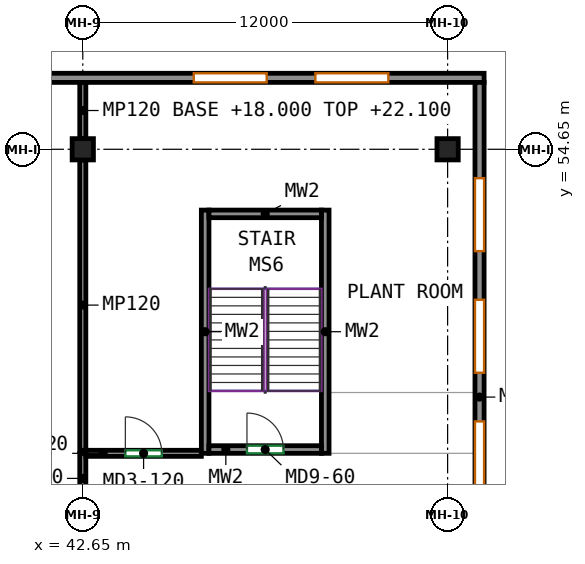
"""IFC4 building model, lengths in metres.
Left out: names, types, materials, properties, quantities, classifications, styles, units other than length and angle.
Written with IfcOpenShell. Run it as: python <this file> out.ifc"""

import sys

from ifc_helpers import new_model, si_unit, direction, frame, frame_2d, origin, origin_2d, place, context, subcontext, project, spatial, rectangle, extrude, source, transform, mapped, element, fill, save


model = new_model("IFC4")
c1 = context("Model", 3, precision=1e-05, world=origin(), true_north=direction((0.0, 1.0)))
c2 = subcontext(c1, "Body", "Model", "MODEL_VIEW")
j1 = project(units=[si_unit("LENGTHUNIT", "METRE"), si_unit("PLANEANGLEUNIT", "RADIAN")], contexts=[c1])
p1 = place(None, origin())
s1 = spatial("IfcSite", under=j1, at=p1, CompositionType="ELEMENT")
p2 = place(p1, origin())
s2 = spatial("IfcBuilding", under=s1, at=p2, CompositionType="ELEMENT")
p3 = place(p2, frame((0.0, 0.0, 18.0)))
s3 = spatial("IfcBuildingStorey", under=s2, at=p3, CompositionType="ELEMENT", Elevation=18.0)
m1 = source(origin(), c2, "Body", "SweptSolid", [
    extrude(rectangle(XDim=0.7, YDim=0.7, at=origin_2d()), origin(), (0.0, 0.0, 1.0), 4.1),
])
for number, where, z_axis, x_axis in (
    (1, (42.65, 54.65, 0.0), (0.0, 0.0, 1.0), (1.0, 0.0, 0.0)),
    (2, (54.65, 54.65, 0.0), (0.0, 0.0, 1.0), (1.0, 0.0, 0.0)),
):
    element("IfcColumn", number, at=place(p3, frame(where, z_axis=z_axis, x_axis=x_axis)), inside=s3, PredefinedType="COLUMN", context=c2, shape_type="MappedRepresentation", body=[
        mapped(m1, transform((0.0, 0.0, 0.0))),
    ])
m2 = source(origin(), c2, "Body", "SweptSolid", [
    extrude(rectangle(XDim=8.0, YDim=0.25, at=frame_2d((4.0, 0.0))), origin(), (0.0, 0.0, 1.0), 4.1),
])
for number, where, z_axis, x_axis in (
    (3, (46.675, 44.65, 0.0), (0.0, 0.0, 1.0), (0.0, 1.0, 0.0)),
    (4, (50.625, 44.65, 0.0), (0.0, 0.0, 1.0), (0.0, 1.0, 0.0)),
):
    element("IfcWall", number, at=place(p3, frame(where, z_axis=z_axis, x_axis=x_axis)), inside=s3, PredefinedType="SHEAR", context=c2, shape_type="MappedRepresentation", body=[
        mapped(m2, transform((0.0, 0.0, 0.0))),
    ])
m3 = source(origin(), c2, "Body", "SweptSolid", [
    extrude(rectangle(XDim=3.7, YDim=0.25, at=frame_2d((1.85, 0.0))), origin(), (0.0, 0.0, 1.0), 4.1),
])
p4 = place(p3, frame((46.8, 44.775, 0.0), z_axis=(0.0, 0.0, 1.0), x_axis=(1.0, 0.0, 0.0)))
e5 = element("IfcWall", 5, at=p4, inside=s3, PredefinedType="SHEAR", context=c2, shape_type="MappedRepresentation", body=[
    mapped(m3, transform((0.0, 0.0, 0.0))),
])
p5 = place(p4, frame((1.25, 0.0, 0.0)))
e6 = element("IfcOpeningElement", 6, at=p5, cuts=e5, PredefinedType="OPENING", context=c2, shape_type="SweptSolid", body=[
    extrude(rectangle(XDim=1.2, YDim=2.1, at=frame_2d((0.6, 1.05))), frame((0.0, 0.135, 0.0), z_axis=(0.0, -1.0, 0.0), x_axis=(1.0, 0.0, 0.0)), (0.0, 0.0, 1.0), 0.27),
])
p6 = place(p3, frame((46.8, 52.525, 0.0), z_axis=(0.0, 0.0, 1.0), x_axis=(1.0, 0.0, 0.0)))
e7 = element("IfcWall", 7, at=p6, inside=s3, PredefinedType="SHEAR", context=c2, shape_type="MappedRepresentation", body=[
    mapped(m3, transform((0.0, 0.0, 0.0))),
])
m4 = source(origin(), c2, "Body", "SweptSolid", [
    extrude(rectangle(XDim=112.7, YDim=0.3, at=frame_2d((56.35, 0.0))), origin(), (0.0, 0.0, 1.0), 4.1),
])
p7 = place(p3, frame((-56.85, 57.0, 0.0), z_axis=(0.0, 0.0, 1.0), x_axis=(1.0, 0.0, 0.0)))
e8 = element("IfcWall", 8, at=p7, inside=s3, PredefinedType="SOLIDWALL", context=c2, shape_type="MappedRepresentation", body=[
    mapped(m4, transform((0.0, 0.0, 0.0))),
])
p8 = place(p7, frame((3.15, 0.0, 0.9)))
e9 = element("IfcOpeningElement", 9, at=p8, cuts=e8, PredefinedType="OPENING", context=c2, shape_type="SweptSolid", body=[
    extrude(rectangle(XDim=2.4, YDim=1.8, at=frame_2d((1.2, 0.9))), frame((0.0, 0.16, 0.0), z_axis=(0.0, -1.0, 0.0), x_axis=(1.0, 0.0, 0.0)), (0.0, 0.0, 1.0), 0.32),
])
p9 = place(p7, frame((7.15, 0.0, 0.9)))
e10 = element("IfcOpeningElement", 10, at=p9, cuts=e8, PredefinedType="OPENING", context=c2, shape_type="SweptSolid", body=[
    extrude(rectangle(XDim=2.4, YDim=1.8, at=frame_2d((1.2, 0.9))), frame((0.0, 0.16, 0.0), z_axis=(0.0, -1.0, 0.0), x_axis=(1.0, 0.0, 0.0)), (0.0, 0.0, 1.0), 0.32),
])
p10 = place(p7, frame((11.15, 0.0, 0.9)))
e11 = element("IfcOpeningElement", 11, at=p10, cuts=e8, PredefinedType="OPENING", context=c2, shape_type="SweptSolid", body=[
    extrude(rectangle(XDim=2.4, YDim=1.8, at=frame_2d((1.2, 0.9))), frame((0.0, 0.16, 0.0), z_axis=(0.0, -1.0, 0.0), x_axis=(1.0, 0.0, 0.0)), (0.0, 0.0, 1.0), 0.32),
])
p11 = place(p7, frame((15.15, 0.0, 0.9)))
e12 = element("IfcOpeningElement", 12, at=p11, cuts=e8, PredefinedType="OPENING", context=c2, shape_type="SweptSolid", body=[
    extrude(rectangle(XDim=2.4, YDim=1.8, at=frame_2d((1.2, 0.9))), frame((0.0, 0.16, 0.0), z_axis=(0.0, -1.0, 0.0), x_axis=(1.0, 0.0, 0.0)), (0.0, 0.0, 1.0), 0.32),
])
p12 = place(p7, frame((19.15, 0.0, 0.9)))
e13 = element("IfcOpeningElement", 13, at=p12, cuts=e8, PredefinedType="OPENING", context=c2, shape_type="SweptSolid", body=[
    extrude(rectangle(XDim=2.4, YDim=1.8, at=frame_2d((1.2, 0.9))), frame((0.0, 0.16, 0.0), z_axis=(0.0, -1.0, 0.0), x_axis=(1.0, 0.0, 0.0)), (0.0, 0.0, 1.0), 0.32),
])
p13 = place(p7, frame((23.15, 0.0, 0.9)))
e14 = element("IfcOpeningElement", 14, at=p13, cuts=e8, PredefinedType="OPENING", context=c2, shape_type="SweptSolid", body=[
    extrude(rectangle(XDim=2.4, YDim=1.8, at=frame_2d((1.2, 0.9))), frame((0.0, 0.16, 0.0), z_axis=(0.0, -1.0, 0.0), x_axis=(1.0, 0.0, 0.0)), (0.0, 0.0, 1.0), 0.32),
])
p14 = place(p7, frame((27.15, 0.0, 0.9)))
e15 = element("IfcOpeningElement", 15, at=p14, cuts=e8, PredefinedType="OPENING", context=c2, shape_type="SweptSolid", body=[
    extrude(rectangle(XDim=2.4, YDim=1.8, at=frame_2d((1.2, 0.9))), frame((0.0, 0.16, 0.0), z_axis=(0.0, -1.0, 0.0), x_axis=(1.0, 0.0, 0.0)), (0.0, 0.0, 1.0), 0.32),
])
p15 = place(p7, frame((31.15, 0.0, 0.9)))
e16 = element("IfcOpeningElement", 16, at=p15, cuts=e8, PredefinedType="OPENING", context=c2, shape_type="SweptSolid", body=[
    extrude(rectangle(XDim=2.4, YDim=1.8, at=frame_2d((1.2, 0.9))), frame((0.0, 0.16, 0.0), z_axis=(0.0, -1.0, 0.0), x_axis=(1.0, 0.0, 0.0)), (0.0, 0.0, 1.0), 0.32),
])
p16 = place(p7, frame((35.15, 0.0, 0.9)))
e17 = element("IfcOpeningElement", 17, at=p16, cuts=e8, PredefinedType="OPENING", context=c2, shape_type="SweptSolid", body=[
    extrude(rectangle(XDim=2.4, YDim=1.8, at=frame_2d((1.2, 0.9))), frame((0.0, 0.16, 0.0), z_axis=(0.0, -1.0, 0.0), x_axis=(1.0, 0.0, 0.0)), (0.0, 0.0, 1.0), 0.32),
])
p17 = place(p7, frame((43.15, 0.0, 0.9)))
e18 = element("IfcOpeningElement", 18, at=p17, cuts=e8, PredefinedType="OPENING", context=c2, shape_type="SweptSolid", body=[
    extrude(rectangle(XDim=2.4, YDim=1.8, at=frame_2d((1.2, 0.9))), frame((0.0, 0.16, 0.0), z_axis=(0.0, -1.0, 0.0), x_axis=(1.0, 0.0, 0.0)), (0.0, 0.0, 1.0), 0.32),
])
p18 = place(p7, frame((47.15, 0.0, 0.9)))
e19 = element("IfcOpeningElement", 19, at=p18, cuts=e8, PredefinedType="OPENING", context=c2, shape_type="SweptSolid", body=[
    extrude(rectangle(XDim=2.4, YDim=1.8, at=frame_2d((1.2, 0.9))), frame((0.0, 0.16, 0.0), z_axis=(0.0, -1.0, 0.0), x_axis=(1.0, 0.0, 0.0)), (0.0, 0.0, 1.0), 0.32),
])
p19 = place(p7, frame((51.15, 0.0, 0.9)))
e20 = element("IfcOpeningElement", 20, at=p19, cuts=e8, PredefinedType="OPENING", context=c2, shape_type="SweptSolid", body=[
    extrude(rectangle(XDim=2.4, YDim=1.8, at=frame_2d((1.2, 0.9))), frame((0.0, 0.16, 0.0), z_axis=(0.0, -1.0, 0.0), x_axis=(1.0, 0.0, 0.0)), (0.0, 0.0, 1.0), 0.32),
])
p20 = place(p7, frame((55.15, 0.0, 0.9)))
e21 = element("IfcOpeningElement", 21, at=p20, cuts=e8, PredefinedType="OPENING", context=c2, shape_type="SweptSolid", body=[
    extrude(rectangle(XDim=2.4, YDim=1.8, at=frame_2d((1.2, 0.9))), frame((0.0, 0.16, 0.0), z_axis=(0.0, -1.0, 0.0), x_axis=(1.0, 0.0, 0.0)), (0.0, 0.0, 1.0), 0.32),
])
p21 = place(p7, frame((59.15, 0.0, 0.9)))
e22 = element("IfcOpeningElement", 22, at=p21, cuts=e8, PredefinedType="OPENING", context=c2, shape_type="SweptSolid", body=[
    extrude(rectangle(XDim=2.4, YDim=1.8, at=frame_2d((1.2, 0.9))), frame((0.0, 0.16, 0.0), z_axis=(0.0, -1.0, 0.0), x_axis=(1.0, 0.0, 0.0)), (0.0, 0.0, 1.0), 0.32),
])
p22 = place(p7, frame((63.15, 0.0, 0.9)))
e23 = element("IfcOpeningElement", 23, at=p22, cuts=e8, PredefinedType="OPENING", context=c2, shape_type="SweptSolid", body=[
    extrude(rectangle(XDim=2.4, YDim=1.8, at=frame_2d((1.2, 0.9))), frame((0.0, 0.16, 0.0), z_axis=(0.0, -1.0, 0.0), x_axis=(1.0, 0.0, 0.0)), (0.0, 0.0, 1.0), 0.32),
])
p23 = place(p7, frame((67.15, 0.0, 0.9)))
e24 = element("IfcOpeningElement", 24, at=p23, cuts=e8, PredefinedType="OPENING", context=c2, shape_type="SweptSolid", body=[
    extrude(rectangle(XDim=2.4, YDim=1.8, at=frame_2d((1.2, 0.9))), frame((0.0, 0.16, 0.0), z_axis=(0.0, -1.0, 0.0), x_axis=(1.0, 0.0, 0.0)), (0.0, 0.0, 1.0), 0.32),
])
p24 = place(p7, frame((71.15, 0.0, 0.9)))
e25 = element("IfcOpeningElement", 25, at=p24, cuts=e8, PredefinedType="OPENING", context=c2, shape_type="SweptSolid", body=[
    extrude(rectangle(XDim=2.4, YDim=1.8, at=frame_2d((1.2, 0.9))), frame((0.0, 0.16, 0.0), z_axis=(0.0, -1.0, 0.0), x_axis=(1.0, 0.0, 0.0)), (0.0, 0.0, 1.0), 0.32),
])
p25 = place(p7, frame((75.15, 0.0, 0.9)))
e26 = element("IfcOpeningElement", 26, at=p25, cuts=e8, PredefinedType="OPENING", context=c2, shape_type="SweptSolid", body=[
    extrude(rectangle(XDim=2.4, YDim=1.8, at=frame_2d((1.2, 0.9))), frame((0.0, 0.16, 0.0), z_axis=(0.0, -1.0, 0.0), x_axis=(1.0, 0.0, 0.0)), (0.0, 0.0, 1.0), 0.32),
])
p26 = place(p7, frame((79.15, 0.0, 0.9)))
e27 = element("IfcOpeningElement", 27, at=p26, cuts=e8, PredefinedType="OPENING", context=c2, shape_type="SweptSolid", body=[
    extrude(rectangle(XDim=2.4, YDim=1.8, at=frame_2d((1.2, 0.9))), frame((0.0, 0.16, 0.0), z_axis=(0.0, -1.0, 0.0), x_axis=(1.0, 0.0, 0.0)), (0.0, 0.0, 1.0), 0.32),
])
p27 = place(p7, frame((83.15, 0.0, 0.9)))
e28 = element("IfcOpeningElement", 28, at=p27, cuts=e8, PredefinedType="OPENING", context=c2, shape_type="SweptSolid", body=[
    extrude(rectangle(XDim=2.4, YDim=1.8, at=frame_2d((1.2, 0.9))), frame((0.0, 0.16, 0.0), z_axis=(0.0, -1.0, 0.0), x_axis=(1.0, 0.0, 0.0)), (0.0, 0.0, 1.0), 0.32),
])
p28 = place(p7, frame((87.15, 0.0, 0.9)))
e29 = element("IfcOpeningElement", 29, at=p28, cuts=e8, PredefinedType="OPENING", context=c2, shape_type="SweptSolid", body=[
    extrude(rectangle(XDim=2.4, YDim=1.8, at=frame_2d((1.2, 0.9))), frame((0.0, 0.16, 0.0), z_axis=(0.0, -1.0, 0.0), x_axis=(1.0, 0.0, 0.0)), (0.0, 0.0, 1.0), 0.32),
])
p29 = place(p7, frame((91.15, 0.0, 0.9)))
e30 = element("IfcOpeningElement", 30, at=p29, cuts=e8, PredefinedType="OPENING", context=c2, shape_type="SweptSolid", body=[
    extrude(rectangle(XDim=2.4, YDim=1.8, at=frame_2d((1.2, 0.9))), frame((0.0, 0.16, 0.0), z_axis=(0.0, -1.0, 0.0), x_axis=(1.0, 0.0, 0.0)), (0.0, 0.0, 1.0), 0.32),
])
p30 = place(p7, frame((95.15, 0.0, 0.9)))
e31 = element("IfcOpeningElement", 31, at=p30, cuts=e8, PredefinedType="OPENING", context=c2, shape_type="SweptSolid", body=[
    extrude(rectangle(XDim=2.4, YDim=1.8, at=frame_2d((1.2, 0.9))), frame((0.0, 0.16, 0.0), z_axis=(0.0, -1.0, 0.0), x_axis=(1.0, 0.0, 0.0)), (0.0, 0.0, 1.0), 0.32),
])
p31 = place(p7, frame((103.15, 0.0, 0.9)))
e32 = element("IfcOpeningElement", 32, at=p31, cuts=e8, PredefinedType="OPENING", context=c2, shape_type="SweptSolid", body=[
    extrude(rectangle(XDim=2.4, YDim=1.8, at=frame_2d((1.2, 0.9))), frame((0.0, 0.16, 0.0), z_axis=(0.0, -1.0, 0.0), x_axis=(1.0, 0.0, 0.0)), (0.0, 0.0, 1.0), 0.32),
])
p32 = place(p7, frame((107.15, 0.0, 0.9)))
e33 = element("IfcOpeningElement", 33, at=p32, cuts=e8, PredefinedType="OPENING", context=c2, shape_type="SweptSolid", body=[
    extrude(rectangle(XDim=2.4, YDim=1.8, at=frame_2d((1.2, 0.9))), frame((0.0, 0.16, 0.0), z_axis=(0.0, -1.0, 0.0), x_axis=(1.0, 0.0, 0.0)), (0.0, 0.0, 1.0), 0.32),
])
m5 = source(origin(), c2, "Body", "SweptSolid", [
    extrude(rectangle(XDim=20.7, YDim=0.3, at=frame_2d((10.35, 0.0))), origin(), (0.0, 0.0, 1.0), 4.1),
])
p33 = place(p3, frame((55.7, 56.85, 0.0), z_axis=(0.0, 0.0, 1.0), x_axis=(0.0, -1.0, 0.0)))
e34 = element("IfcWall", 34, at=p33, inside=s3, PredefinedType="SOLIDWALL", context=c2, shape_type="MappedRepresentation", body=[
    mapped(m5, transform((0.0, 0.0, 0.0))),
])
p34 = place(p33, frame((3.15, 0.0, 0.9)))
e35 = element("IfcOpeningElement", 35, at=p34, cuts=e34, PredefinedType="OPENING", context=c2, shape_type="SweptSolid", body=[
    extrude(rectangle(XDim=2.4, YDim=1.8, at=frame_2d((1.2, 0.9))), frame((0.0, 0.16, 0.0), z_axis=(0.0, -1.0, 0.0), x_axis=(1.0, 0.0, 0.0)), (0.0, 0.0, 1.0), 0.32),
])
p35 = place(p33, frame((7.15, 0.0, 0.9)))
e36 = element("IfcOpeningElement", 36, at=p35, cuts=e34, PredefinedType="OPENING", context=c2, shape_type="SweptSolid", body=[
    extrude(rectangle(XDim=2.4, YDim=1.8, at=frame_2d((1.2, 0.9))), frame((0.0, 0.16, 0.0), z_axis=(0.0, -1.0, 0.0), x_axis=(1.0, 0.0, 0.0)), (0.0, 0.0, 1.0), 0.32),
])
p36 = place(p33, frame((11.15, 0.0, 0.9)))
e37 = element("IfcOpeningElement", 37, at=p36, cuts=e34, PredefinedType="OPENING", context=c2, shape_type="SweptSolid", body=[
    extrude(rectangle(XDim=2.4, YDim=1.8, at=frame_2d((1.2, 0.9))), frame((0.0, 0.16, 0.0), z_axis=(0.0, -1.0, 0.0), x_axis=(1.0, 0.0, 0.0)), (0.0, 0.0, 1.0), 0.32),
])
p37 = place(p33, frame((15.15, 0.0, 0.9)))
e38 = element("IfcOpeningElement", 38, at=p37, cuts=e34, PredefinedType="OPENING", context=c2, shape_type="SweptSolid", body=[
    extrude(rectangle(XDim=2.4, YDim=1.8, at=frame_2d((1.2, 0.9))), frame((0.0, 0.16, 0.0), z_axis=(0.0, -1.0, 0.0), x_axis=(1.0, 0.0, 0.0)), (0.0, 0.0, 1.0), 0.32),
])
m6 = source(origin(), c2, "Body", "SweptSolid", [
    extrude(rectangle(XDim=1.65, YDim=0.2, at=frame_2d((0.825, 0.0))), origin(), (0.0, 0.0, 1.0), 3.3),
])
p38 = place(p3, frame((42.65, 43.0, 0.0), z_axis=(0.0, 0.0, 1.0), x_axis=(0.0, 1.0, 0.0)))
e39 = element("IfcWall", 39, at=p38, inside=s3, PredefinedType="PARTITIONING", context=c2, shape_type="MappedRepresentation", body=[
    mapped(m6, transform((0.0, 0.0, 0.0))),
])
m7 = source(origin(), c2, "Body", "SweptSolid", [
    extrude(rectangle(XDim=3.8, YDim=0.2, at=frame_2d((1.9, 0.0))), origin(), (0.0, 0.0, 1.0), 3.3),
])
p39 = place(p3, frame((42.75, 44.65, 0.0), z_axis=(0.0, 0.0, 1.0), x_axis=(1.0, 0.0, 0.0)))
e40 = element("IfcWall", 40, at=p39, inside=s3, PredefinedType="PARTITIONING", context=c2, shape_type="MappedRepresentation", body=[
    mapped(m7, transform((0.0, 0.0, 0.0))),
])
p40 = place(p39, frame((1.3, 0.0, 0.0)))
e41 = element("IfcOpeningElement", 41, at=p40, cuts=e40, PredefinedType="OPENING", context=c2, shape_type="SweptSolid", body=[
    extrude(rectangle(XDim=1.2, YDim=2.1, at=frame_2d((0.6, 1.05))), frame((0.0, 0.11, 0.0), z_axis=(0.0, -1.0, 0.0), x_axis=(1.0, 0.0, 0.0)), (0.0, 0.0, 1.0), 0.22),
])
m8 = source(origin(), c2, "Body", "SweptSolid", [
    extrude(rectangle(XDim=9.55, YDim=0.2, at=frame_2d((4.775, 0.0))), origin(), (0.0, 0.0, 1.0), 3.3),
])
p41 = place(p3, frame((42.65, 54.3, 0.0), z_axis=(0.0, 0.0, 1.0), x_axis=(0.0, -1.0, 0.0)))
e42 = element("IfcWall", 42, at=p41, inside=s3, PredefinedType="PARTITIONING", context=c2, shape_type="MappedRepresentation", body=[
    mapped(m8, transform((0.0, 0.0, 0.0))),
])
m9 = source(origin(), c2, "Body", "SweptSolid", [
    extrude(rectangle(XDim=1.85, YDim=0.2, at=frame_2d((0.925, 0.0))), origin(), (0.0, 0.0, 1.0), 4.1),
])
p42 = place(p3, frame((42.65, 56.85, 0.0), z_axis=(0.0, 0.0, 1.0), x_axis=(0.0, -1.0, 0.0)))
e43 = element("IfcWall", 43, at=p42, inside=s3, PredefinedType="PARTITIONING", context=c2, shape_type="MappedRepresentation", body=[
    mapped(m9, transform((0.0, 0.0, 0.0))),
])
p43 = place(p31, origin())
e44 = element("IfcWindow", 44, at=p43, inside=s3, PartitioningType="SINGLE_PANEL", PredefinedType="WINDOW", context=c2, shape_type="SweptSolid", body=[
    extrude(rectangle(XDim=2.4, YDim=1.8, at=frame_2d((1.2, 0.9))), frame((0.0, 0.03, 0.0), z_axis=(0.0, -1.0, 0.0), x_axis=(1.0, 0.0, 0.0)), (0.0, 0.0, 1.0), 0.06),
])
fill(e32, e44)
p44 = place(p32, origin())
e45 = element("IfcWindow", 45, at=p44, inside=s3, PartitioningType="SINGLE_PANEL", PredefinedType="WINDOW", context=c2, shape_type="SweptSolid", body=[
    extrude(rectangle(XDim=2.4, YDim=1.8, at=frame_2d((1.2, 0.9))), frame((0.0, 0.03, 0.0), z_axis=(0.0, -1.0, 0.0), x_axis=(1.0, 0.0, 0.0)), (0.0, 0.0, 1.0), 0.06),
])
fill(e33, e45)
p45 = place(p34, origin())
e46 = element("IfcWindow", 46, at=p45, inside=s3, PartitioningType="SINGLE_PANEL", PredefinedType="WINDOW", context=c2, shape_type="SweptSolid", body=[
    extrude(rectangle(XDim=2.4, YDim=1.8, at=frame_2d((1.2, 0.9))), frame((0.0, 0.03, 0.0), z_axis=(0.0, -1.0, 0.0), x_axis=(1.0, 0.0, 0.0)), (0.0, 0.0, 1.0), 0.06),
])
fill(e35, e46)
p46 = place(p35, origin())
e47 = element("IfcWindow", 47, at=p46, inside=s3, PartitioningType="SINGLE_PANEL", PredefinedType="WINDOW", context=c2, shape_type="SweptSolid", body=[
    extrude(rectangle(XDim=2.4, YDim=1.8, at=frame_2d((1.2, 0.9))), frame((0.0, 0.03, 0.0), z_axis=(0.0, -1.0, 0.0), x_axis=(1.0, 0.0, 0.0)), (0.0, 0.0, 1.0), 0.06),
])
fill(e36, e47)
p47 = place(p36, origin())
e48 = element("IfcWindow", 48, at=p47, inside=s3, PartitioningType="SINGLE_PANEL", PredefinedType="WINDOW", context=c2, shape_type="SweptSolid", body=[
    extrude(rectangle(XDim=2.4, YDim=1.8, at=frame_2d((1.2, 0.9))), frame((0.0, 0.03, 0.0), z_axis=(0.0, -1.0, 0.0), x_axis=(1.0, 0.0, 0.0)), (0.0, 0.0, 1.0), 0.06),
])
fill(e37, e48)
p48 = place(p5, origin())
e49 = element("IfcDoor", 49, at=p48, inside=s3, OperationType="DOUBLE_DOOR_SINGLE_SWING", PredefinedType="DOOR", context=c2, shape_type="SweptSolid", body=[
    extrude(rectangle(XDim=1.2, YDim=2.1, at=frame_2d((0.6, 1.05))), frame((0.0, 0.025, 0.0), z_axis=(0.0, -1.0, 0.0), x_axis=(1.0, 0.0, 0.0)), (0.0, 0.0, 1.0), 0.05),
])
fill(e6, e49)
p49 = place(p40, origin())
e50 = element("IfcDoor", 50, at=p49, inside=s3, OperationType="SINGLE_SWING_LEFT", PredefinedType="DOOR", context=c2, shape_type="SweptSolid", body=[
    extrude(rectangle(XDim=1.2, YDim=2.1, at=frame_2d((0.6, 1.05))), frame((0.0, 0.025, 0.0), z_axis=(0.0, -1.0, 0.0), x_axis=(1.0, 0.0, 0.0)), (0.0, 0.0, 1.0), 0.05),
])
fill(e41, e50)
save(model, sys.argv[1])
